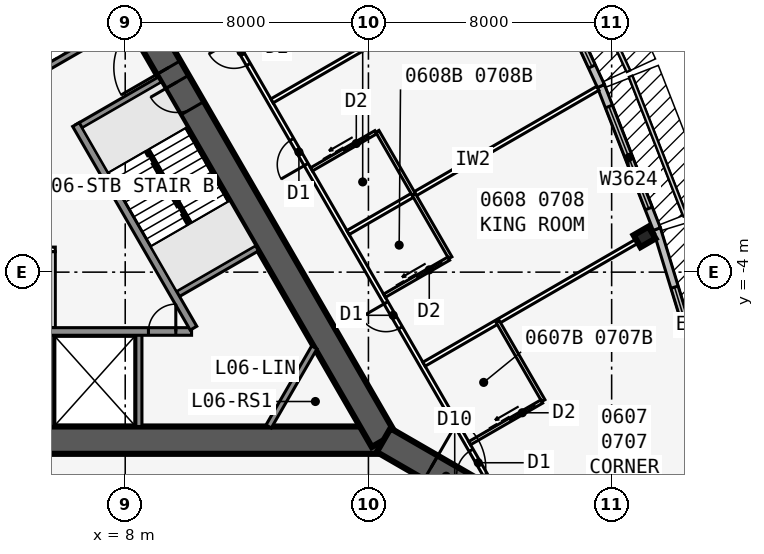
"""IFC4 building model, lengths in metres.
Left out: names, types, materials, properties, quantities, classifications, styles, units other than length and angle.
Written with IfcOpenShell. Run it as: python <this file> out.ifc"""

import sys

from ifc_helpers import new_model, si_unit, direction, frame, frame_2d, origin, origin_2d, place, context, subcontext, project, spatial, rectangle, i_section, extrude, element, fill, save


model = new_model("IFC4")
c1 = context("Model", 3, precision=1e-05, world=origin(), true_north=direction((0.0, 1.0)))
c2 = subcontext(c1, "Body", "Model", "MODEL_VIEW")
j1 = project(units=[si_unit("LENGTHUNIT", "METRE"), si_unit("PLANEANGLEUNIT", "RADIAN")], contexts=[c1])
p1 = place(None, origin())
s1 = spatial("IfcSite", under=j1, at=p1, CompositionType="ELEMENT")
p2 = place(p1, origin())
s2 = spatial("IfcBuilding", under=s1, at=p2, CompositionType="ELEMENT")
p3 = place(p2, frame((0.0, 0.0, 31.9)))
s3 = spatial("IfcBuildingStorey", under=s2, at=p3, CompositionType="ELEMENT", Elevation=31.9)
p4 = place(p3, frame((-16.5, -9.526, 0.0), z_axis=(0.0, 0.0, 1.0), x_axis=(1.0, 0.0, 0.0)))
e1 = element("IfcWall", 1, at=p4, inside=s3, PredefinedType="SHEAR", context=c2, shape_type="SweptSolid", body=[
    extrude(rectangle(XDim=33.0, YDim=0.9, at=frame_2d((16.5, 0.0))), origin(), (0.0, 0.0, 1.0), 3.4),
])
p5 = place(p4, frame((14.05, 0.0, 0.0)))
e2 = element("IfcOpeningElement", 2, at=p5, cuts=e1, PredefinedType="OPENING", context=c2, shape_type="SweptSolid", body=[
    extrude(rectangle(XDim=1.8, YDim=2.13, at=frame_2d((0.9, 1.065))), frame((0.0, 0.46, 0.0), z_axis=(0.0, -1.0, 0.0), x_axis=(1.0, 0.0, 0.0)), (0.0, 0.0, 1.0), 0.92),
])
p6 = place(p3, frame((-0.55, -5.951, 0.0), z_axis=(0.0, 0.0, 1.0), x_axis=(1.0, 0.0, 0.0)))
e3 = element("IfcWall", 3, at=p6, inside=s3, PredefinedType="SOLIDWALL", context=c2, shape_type="SweptSolid", body=[
    extrude(rectangle(XDim=10.733, YDim=0.25, at=frame_2d((5.366, 0.0))), origin(), (0.0, 0.0, 1.0), 3.235),
])
p7 = place(p6, frame((9.314, 0.0, 0.0)))
e4 = element("IfcOpeningElement", 4, at=p7, cuts=e3, PredefinedType="OPENING", context=c2, shape_type="SweptSolid", body=[
    extrude(rectangle(XDim=0.9, YDim=2.13, at=frame_2d((0.45, 1.065))), frame((0.0, 0.135, 0.0), z_axis=(0.0, -1.0, 0.0), x_axis=(1.0, 0.0, 0.0)), (0.0, 0.0, 1.0), 0.27),
])
p8 = place(p6, frame((1.05, 0.0, 0.0)))
e5 = element("IfcOpeningElement", 5, at=p8, cuts=e3, PredefinedType="OPENING", context=c2, shape_type="SweptSolid", body=[
    extrude(rectangle(XDim=1.1, YDim=2.13, at=frame_2d((0.55, 1.065))), frame((0.0, 0.135, 0.0), z_axis=(0.0, -1.0, 0.0), x_axis=(1.0, 0.0, 0.0)), (0.0, 0.0, 1.0), 0.27),
])
p9 = place(p6, frame((4.05, 0.0, 0.0)))
e6 = element("IfcOpeningElement", 6, at=p9, cuts=e3, PredefinedType="OPENING", context=c2, shape_type="SweptSolid", body=[
    extrude(rectangle(XDim=1.1, YDim=2.13, at=frame_2d((0.55, 1.065))), frame((0.0, 0.135, 0.0), z_axis=(0.0, -1.0, 0.0), x_axis=(1.0, 0.0, 0.0)), (0.0, 0.0, 1.0), 0.27),
])
for number, where, z_axis, x_axis in (
    (7, (5.55, -5.951, 0.0), (0.0, 0.0, 1.0), (0.0, -1.0, 0.0)),
    (8, (8.45, -5.951, 0.0), (0.0, 0.0, 1.0), (0.0, -1.0, 0.0)),
):
    element("IfcWall", number, at=place(p3, frame(where, z_axis=z_axis, x_axis=x_axis)), inside=s3, PredefinedType="SOLIDWALL", context=c2, shape_type="SweptSolid", body=[
        extrude(rectangle(XDim=3.125, YDim=0.2, at=frame_2d((1.562, 0.0))), origin(), (0.0, 0.0, 1.0), 3.235),
    ])
p10 = place(p3, frame((16.5, -9.526, 0.0), z_axis=(0.0, 0.0, 1.0), x_axis=(-0.499999749417, 0.866025548458, 0.0)))
e9 = element("IfcWall", 9, at=p10, inside=s3, PredefinedType="SHEAR", context=c2, shape_type="SweptSolid", body=[
    extrude(rectangle(XDim=33.0, YDim=0.9, at=frame_2d((16.5, 0.0))), origin(), (0.0, 0.0, 1.0), 3.4),
])
p11 = place(p10, frame((14.15, 0.0, 0.0)))
e10 = element("IfcOpeningElement", 10, at=p11, cuts=e9, PredefinedType="OPENING", context=c2, shape_type="SweptSolid", body=[
    extrude(rectangle(XDim=1.8, YDim=2.13, at=frame_2d((0.9, 1.065))), frame((0.0, 0.46, 0.0), z_axis=(0.0, -1.0, 0.0), x_axis=(1.0, 0.0, 0.0)), (0.0, 0.0, 1.0), 0.92),
])
p12 = place(p10, frame((12.6, 0.0, 0.0)))
e11 = element("IfcOpeningElement", 11, at=p12, cuts=e9, PredefinedType="OPENING", context=c2, shape_type="SweptSolid", body=[
    extrude(rectangle(XDim=1.0, YDim=2.13, at=frame_2d((0.5, 1.065))), frame((0.0, 0.46, 0.0), z_axis=(0.0, -1.0, 0.0), x_axis=(1.0, 0.0, 0.0)), (0.0, 0.0, 1.0), 0.92),
])
p13 = place(p3, frame((10.245, -5.843, 0.0), z_axis=(0.0, 0.0, 1.0), x_axis=(-0.499993009313, 0.866029439822, 0.0)))
e12 = element("IfcWall", 12, at=p13, inside=s3, PredefinedType="SOLIDWALL", context=c2, shape_type="SweptSolid", body=[
    extrude(rectangle(XDim=7.733, YDim=0.25, at=frame_2d((3.866, 0.0))), origin(), (0.0, 0.0, 1.0), 3.235),
])
for number, where, z_axis, x_axis in (
    (13, (9.629, -4.775, 0.0), (0.0, 0.0, 1.0), (0.866, 0.5, 0.0)),
    (14, (6.429, 0.767, 0.0), (0.0, 0.0, 1.0), (0.866, 0.5, 0.0)),
    (15, (5.329, 2.673, 0.0), (0.0, 0.0, 1.0), (0.866, 0.5, 0.0)),
):
    element("IfcWall", number, at=place(p3, frame(where, z_axis=z_axis, x_axis=x_axis)), inside=s3, PredefinedType="SOLIDWALL", context=c2, shape_type="SweptSolid", body=[
        extrude(rectangle(XDim=3.125, YDim=0.2, at=frame_2d((1.562, 0.0))), origin(), (0.0, 0.0, 1.0), 3.235),
    ])
p14 = place(p3, frame((16.5, -9.526, 0.0), z_axis=(0.0, 0.0, 1.0), x_axis=(0.866031398331, -0.499989616998, 0.0)))
e16 = element("IfcWall", 16, at=p14, inside=s3, PredefinedType="SHEAR", context=c2, shape_type="SweptSolid", body=[
    extrude(rectangle(XDim=4.746, YDim=0.9, at=frame_2d((2.373, 0.0))), origin(), (0.0, 0.0, 1.0), 3.4),
])
p15 = place(p14, frame((1.8, 0.0, 0.0)))
e17 = element("IfcOpeningElement", 17, at=p15, cuts=e16, PredefinedType="OPENING", context=c2, shape_type="SweptSolid", body=[
    extrude(rectangle(XDim=1.8, YDim=2.13, at=frame_2d((0.9, 1.065))), frame((0.0, 0.46, 0.0), z_axis=(0.0, -1.0, 0.0), x_axis=(1.0, 0.0, 0.0)), (0.0, 0.0, 1.0), 0.92),
])
p16 = place(p3, frame((25.083, -2.839, 0.0), z_axis=(0.0, 0.0, 1.0), x_axis=(-0.5, 0.866025403784, 0.0)))
e18 = element("IfcColumn", 18, at=p16, inside=s3, PredefinedType="COLUMN", context=c2, shape_type="SweptSolid", body=[
    extrude(i_section(OverallWidth=0.455, OverallDepth=0.569, WebThickness=0.078, FlangeThickness=0.125, at=origin_2d()), origin(), (0.0, 0.0, 1.0), 3.4),
])
p17 = place(p3, frame((27.88, -10.429, 0.0), z_axis=(0.0, 0.0, 1.0), x_axis=(-0.2919790669, 0.956424709265, 0.0)))
e19 = element("IfcWall", 19, at=p17, inside=s3, PredefinedType="STANDARD", context=c2, shape_type="SweptSolid", body=[
    extrude(rectangle(XDim=8.211, YDim=0.25, at=frame_2d((4.105, 0.0))), origin(), (0.0, 0.0, 1.0), 3.235),
])
p18 = place(p17, frame((2.006, 0.0, 0.45)))
e20 = element("IfcOpeningElement", 20, at=p18, cuts=e19, PredefinedType="OPENING", context=c2, shape_type="SweptSolid", body=[
    extrude(rectangle(XDim=4.2, YDim=2.4, at=frame_2d((2.1, 1.2))), frame((0.0, 0.135, 0.0), z_axis=(0.0, -1.0, 0.0), x_axis=(1.0, 0.0, 0.0)), (0.0, 0.0, 1.0), 0.27),
])
p19 = place(p3, frame((25.486, -2.584, 0.0), z_axis=(0.0, 0.0, 1.0), x_axis=(-0.364013463868, 0.931393685894, 0.0)))
e21 = element("IfcWall", 21, at=p19, inside=s3, PredefinedType="STANDARD", context=c2, shape_type="SweptSolid", body=[
    extrude(rectangle(XDim=5.058, YDim=0.25, at=frame_2d((2.529, 0.0))), origin(), (0.0, 0.0, 1.0), 3.235),
])
p20 = place(p19, frame((0.729, 0.0, 0.45)))
e22 = element("IfcOpeningElement", 22, at=p20, cuts=e21, PredefinedType="OPENING", context=c2, shape_type="SweptSolid", body=[
    extrude(rectangle(XDim=3.6, YDim=2.4, at=frame_2d((1.8, 1.2))), frame((0.0, 0.135, 0.0), z_axis=(0.0, -1.0, 0.0), x_axis=(1.0, 0.0, 0.0)), (0.0, 0.0, 1.0), 0.27),
])
p21 = place(p3, frame((23.648, 2.119, 0.0), z_axis=(0.0, 0.0, 1.0), x_axis=(-0.419203100754, 0.907892482796, 0.0)))
e23 = element("IfcWall", 23, at=p21, inside=s3, PredefinedType="STANDARD", context=c2, shape_type="SweptSolid", body=[
    extrude(rectangle(XDim=5.021, YDim=0.25, at=frame_2d((2.51, 0.0))), origin(), (0.0, 0.0, 1.0), 3.235),
])
p22 = place(p21, frame((0.71, 0.0, 0.45)))
e24 = element("IfcOpeningElement", 24, at=p22, cuts=e23, PredefinedType="OPENING", context=c2, shape_type="SweptSolid", body=[
    extrude(rectangle(XDim=3.6, YDim=2.4, at=frame_2d((1.8, 1.2))), frame((0.0, 0.135, 0.0), z_axis=(0.0, -1.0, 0.0), x_axis=(1.0, 0.0, 0.0)), (0.0, 0.0, 1.0), 0.27),
])
p23 = place(p3, frame((20.027, -10.985, 0.0), z_axis=(0.0, 0.0, 1.0), x_axis=(-0.500001677587, 0.866024435227, 0.0)))
e25 = element("IfcWall", 25, at=p23, inside=s3, PredefinedType="PARTITIONING", context=c2, shape_type="SweptSolid", body=[
    extrude(rectangle(XDim=39.054, YDim=0.15, at=frame_2d((19.527, 0.0))), origin(), (0.0, 0.0, 1.0), 3.235),
])
p24 = place(p23, frame((0.352, 0.0, 0.0)))
e26 = element("IfcOpeningElement", 26, at=p24, cuts=e25, PredefinedType="OPENING", context=c2, shape_type="SweptSolid", body=[
    extrude(rectangle(XDim=0.95, YDim=2.13, at=frame_2d((0.475, 1.065))), frame((0.0, 0.085, 0.0), z_axis=(0.0, -1.0, 0.0), x_axis=(1.0, 0.0, 0.0)), (0.0, 0.0, 1.0), 0.17),
])
p25 = place(p23, frame((5.952, 0.0, 0.0)))
e27 = element("IfcOpeningElement", 27, at=p25, cuts=e25, PredefinedType="OPENING", context=c2, shape_type="SweptSolid", body=[
    extrude(rectangle(XDim=0.95, YDim=2.13, at=frame_2d((0.475, 1.065))), frame((0.0, 0.085, 0.0), z_axis=(0.0, -1.0, 0.0), x_axis=(1.0, 0.0, 0.0)), (0.0, 0.0, 1.0), 0.17),
])
p26 = place(p23, frame((12.152, 0.0, 0.0)))
e28 = element("IfcOpeningElement", 28, at=p26, cuts=e25, PredefinedType="OPENING", context=c2, shape_type="SweptSolid", body=[
    extrude(rectangle(XDim=0.95, YDim=2.13, at=frame_2d((0.475, 1.065))), frame((0.0, 0.085, 0.0), z_axis=(0.0, -1.0, 0.0), x_axis=(1.0, 0.0, 0.0)), (0.0, 0.0, 1.0), 0.17),
])
p27 = place(p23, frame((15.952, 0.0, 0.0)))
e29 = element("IfcOpeningElement", 29, at=p27, cuts=e25, PredefinedType="OPENING", context=c2, shape_type="SweptSolid", body=[
    extrude(rectangle(XDim=0.95, YDim=2.13, at=frame_2d((0.475, 1.065))), frame((0.0, 0.085, 0.0), z_axis=(0.0, -1.0, 0.0), x_axis=(1.0, 0.0, 0.0)), (0.0, 0.0, 1.0), 0.17),
])
p28 = place(p23, frame((22.152, 0.0, 0.0)))
e30 = element("IfcOpeningElement", 30, at=p28, cuts=e25, PredefinedType="OPENING", context=c2, shape_type="SweptSolid", body=[
    extrude(rectangle(XDim=0.95, YDim=2.13, at=frame_2d((0.475, 1.065))), frame((0.0, 0.085, 0.0), z_axis=(0.0, -1.0, 0.0), x_axis=(1.0, 0.0, 0.0)), (0.0, 0.0, 1.0), 0.17),
])
p29 = place(p23, frame((25.952, 0.0, 0.0)))
e31 = element("IfcOpeningElement", 31, at=p29, cuts=e25, PredefinedType="OPENING", context=c2, shape_type="SweptSolid", body=[
    extrude(rectangle(XDim=0.95, YDim=2.13, at=frame_2d((0.475, 1.065))), frame((0.0, 0.085, 0.0), z_axis=(0.0, -1.0, 0.0), x_axis=(1.0, 0.0, 0.0)), (0.0, 0.0, 1.0), 0.17),
])
p30 = place(p23, frame((36.546, 0.0, 0.0)))
e32 = element("IfcOpeningElement", 32, at=p30, cuts=e25, PredefinedType="OPENING", context=c2, shape_type="SweptSolid", body=[
    extrude(rectangle(XDim=0.95, YDim=2.13, at=frame_2d((0.475, 1.065))), frame((0.0, 0.085, 0.0), z_axis=(0.0, -1.0, 0.0), x_axis=(1.0, 0.0, 0.0)), (0.0, 0.0, 1.0), 0.17),
])
p31 = place(p3, frame((17.829, -7.027, 0.0), z_axis=(0.0, 0.0, 1.0), x_axis=(0.866032659912, 0.499987431809, 0.0)))
e33 = element("IfcWall", 33, at=p31, inside=s3, PredefinedType="PARTITIONING", context=c2, shape_type="SweptSolid", body=[
    extrude(rectangle(XDim=8.72, YDim=0.15, at=frame_2d((4.36, 0.0))), origin(), (0.0, 0.0, 1.0), 2.389),
])
p32 = place(p3, frame((15.329, -2.697, 0.0), z_axis=(0.0, 0.0, 1.0), x_axis=(0.866018409083, 0.500012114982, 0.0)))
e34 = element("IfcWall", 34, at=p32, inside=s3, PredefinedType="PARTITIONING", context=c2, shape_type="SweptSolid", body=[
    extrude(rectangle(XDim=9.485, YDim=0.15, at=frame_2d((4.742, 0.0))), origin(), (0.0, 0.0, 1.0), 2.389),
])
p33 = place(p3, frame((12.829, 1.633, 0.0), z_axis=(0.0, 0.0, 1.0), x_axis=(0.866026934769, 0.499997348248, 0.0)))
e35 = element("IfcWall", 35, at=p33, inside=s3, PredefinedType="PARTITIONING", context=c2, shape_type="SweptSolid", body=[
    extrude(rectangle(XDim=9.943, YDim=0.15, at=frame_2d((4.971, 0.0))), origin(), (0.0, 0.0, 1.0), 2.389),
])
p34 = place(p3, frame((21.753, -8.225, 0.0), z_axis=(0.0, 0.0, 1.0), x_axis=(-0.499990139034, 0.866031096941, 0.0)))
e36 = element("IfcWall", 36, at=p34, inside=s3, PredefinedType="PLUMBINGWALL", context=c2, shape_type="SweptSolid", body=[
    extrude(rectangle(XDim=3.0, YDim=0.12, at=frame_2d((1.5, 0.0))), origin(), (0.0, 0.0, 1.0), 3.235),
])
p35 = place(p3, frame((19.329, -9.625, 0.0), z_axis=(0.0, 0.0, 1.0), x_axis=(0.866035715982, 0.499982138324, 0.0)))
e37 = element("IfcWall", 37, at=p35, inside=s3, PredefinedType="PLUMBINGWALL", context=c2, shape_type="SweptSolid", body=[
    extrude(rectangle(XDim=2.74, YDim=0.12, at=frame_2d((1.37, 0.0))), origin(), (0.0, 0.0, 1.0), 3.235),
])
p36 = place(p35, frame((1.55, 0.0, 0.0)))
e38 = element("IfcOpeningElement", 38, at=p36, cuts=e37, PredefinedType="OPENING", context=c2, shape_type="SweptSolid", body=[
    extrude(rectangle(XDim=0.9, YDim=2.13, at=frame_2d((0.45, 1.065))), frame((0.0, 0.07, 0.0), z_axis=(0.0, -1.0, 0.0), x_axis=(1.0, 0.0, 0.0)), (0.0, 0.0, 1.0), 0.14),
])
p37 = place(p3, frame((18.694, -3.526, 0.0), z_axis=(0.0, 0.0, 1.0), x_axis=(-0.500033551112, 0.866006032174, 0.0)))
e39 = element("IfcWall", 39, at=p37, inside=s3, PredefinedType="PLUMBINGWALL", context=c2, shape_type="SweptSolid", body=[
    extrude(rectangle(XDim=2.4, YDim=0.12, at=frame_2d((1.2, 0.0))), origin(), (0.0, 0.0, 1.0), 3.235),
])
p38 = place(p3, frame((16.529, -4.776, 0.0), z_axis=(0.0, 0.0, 1.0), x_axis=(0.866023955769, 0.500002508028, 0.0)))
e40 = element("IfcWall", 40, at=p38, inside=s3, PredefinedType="PLUMBINGWALL", context=c2, shape_type="SweptSolid", body=[
    extrude(rectangle(XDim=2.44, YDim=0.12, at=frame_2d((1.22, 0.0))), origin(), (0.0, 0.0, 1.0), 3.235),
])
p39 = place(p38, frame((1.25, 0.0, 0.0)))
e41 = element("IfcOpeningElement", 41, at=p39, cuts=e40, PredefinedType="OPENING", context=c2, shape_type="SweptSolid", body=[
    extrude(rectangle(XDim=0.9, YDim=2.13, at=frame_2d((0.45, 1.065))), frame((0.0, 0.07, 0.0), z_axis=(0.0, -1.0, 0.0), x_axis=(1.0, 0.0, 0.0)), (0.0, 0.0, 1.0), 0.14),
])
p40 = place(p3, frame((17.493, -1.447, 0.0), z_axis=(0.0, 0.0, 1.0), x_axis=(-0.500001309137, 0.866024647952, 0.0)))
e42 = element("IfcWall", 42, at=p40, inside=s3, PredefinedType="PLUMBINGWALL", context=c2, shape_type="SweptSolid", body=[
    extrude(rectangle(XDim=2.4, YDim=0.12, at=frame_2d((1.2, 0.0))), origin(), (0.0, 0.0, 1.0), 3.235),
])
p41 = place(p3, frame((14.128, -0.619, 0.0), z_axis=(0.0, 0.0, 1.0), x_axis=(0.866048967903, 0.499959183527, 0.0)))
e43 = element("IfcWall", 43, at=p41, inside=s3, PredefinedType="PLUMBINGWALL", context=c2, shape_type="SweptSolid", body=[
    extrude(rectangle(XDim=2.44, YDim=0.12, at=frame_2d((1.22, 0.0))), origin(), (0.0, 0.0, 1.0), 3.235),
])
p42 = place(p41, frame((1.25, 0.0, 0.0)))
e44 = element("IfcOpeningElement", 44, at=p42, cuts=e43, PredefinedType="OPENING", context=c2, shape_type="SweptSolid", body=[
    extrude(rectangle(XDim=0.9, YDim=2.13, at=frame_2d((0.45, 1.065))), frame((0.0, 0.07, 0.0), z_axis=(0.0, -1.0, 0.0), x_axis=(1.0, 0.0, 0.0)), (0.0, 0.0, 1.0), 0.14),
])
p43 = place(p3, frame((-2.65, -3.251, 0.0), z_axis=(0.0, 0.0, 1.0), x_axis=(1.0, 0.0, 0.0)))
e45 = element("IfcWall", 45, at=p43, inside=s3, PredefinedType="PARTITIONING", context=c2, shape_type="SweptSolid", body=[
    extrude(rectangle(XDim=8.35, YDim=0.15, at=frame_2d((4.175, 0.0))), origin(), (0.0, 0.0, 1.0), 3.235),
])
p44 = place(p3, frame((5.625, -5.826, 0.0), z_axis=(0.0, 0.0, 1.0), x_axis=(0.0, 1.0, 0.0)))
e46 = element("IfcWall", 46, at=p44, inside=s3, PredefinedType="PARTITIONING", context=c2, shape_type="SweptSolid", body=[
    extrude(rectangle(XDim=2.5, YDim=0.15, at=frame_2d((1.25, 0.0))), origin(), (0.0, 0.0, 1.0), 3.235),
])
p45 = place(p3, frame((14.219, -6.476, 0.0), z_axis=(0.0, 0.0, 1.0), x_axis=(-0.499952404951, -0.866052881055, 0.0)))
e47 = element("IfcWall", 47, at=p45, inside=s3, PredefinedType="SOLIDWALL", context=c2, shape_type="SweptSolid", body=[
    extrude(rectangle(XDim=3.002, YDim=0.2, at=frame_2d((1.501, 0.0))), origin(), (0.0, 0.0, 1.0), 3.235),
])
p46 = place(p3, frame((10.135, -2.401, 0.0), z_axis=(0.0, 0.0, 1.0), x_axis=(-0.499992232847, 0.866029888106, 0.0)))
e48 = element("IfcWall", 48, at=p46, inside=s3, PredefinedType="SOLIDWALL", context=c2, shape_type="SweptSolid", body=[
    extrude(rectangle(XDim=2.794, YDim=0.1, at=frame_2d((1.397, 0.0))), origin(), (0.0, 0.0, 1.0), 3.4),
])
p47 = place(p18, origin())
e49 = element("IfcWindow", 49, at=p47, inside=s3, PartitioningType="SINGLE_PANEL", PredefinedType="WINDOW", context=c2, shape_type="SweptSolid", body=[
    extrude(rectangle(XDim=4.2, YDim=2.4, at=frame_2d((2.1, 1.2))), frame((0.0, 0.03, 0.0), z_axis=(0.0, -1.0, 0.0), x_axis=(1.0, 0.0, 0.0)), (0.0, 0.0, 1.0), 0.06),
])
fill(e20, e49)
p48 = place(p20, origin())
e50 = element("IfcWindow", 50, at=p48, inside=s3, PartitioningType="SINGLE_PANEL", PredefinedType="WINDOW", context=c2, shape_type="SweptSolid", body=[
    extrude(rectangle(XDim=3.6, YDim=2.4, at=frame_2d((1.8, 1.2))), frame((0.0, 0.03, 0.0), z_axis=(0.0, -1.0, 0.0), x_axis=(1.0, 0.0, 0.0)), (0.0, 0.0, 1.0), 0.06),
])
fill(e22, e50)
p49 = place(p22, origin())
e51 = element("IfcWindow", 51, at=p49, inside=s3, PartitioningType="SINGLE_PANEL", PredefinedType="WINDOW", context=c2, shape_type="SweptSolid", body=[
    extrude(rectangle(XDim=3.6, YDim=2.4, at=frame_2d((1.8, 1.2))), frame((0.0, 0.03, 0.0), z_axis=(0.0, -1.0, 0.0), x_axis=(1.0, 0.0, 0.0)), (0.0, 0.0, 1.0), 0.06),
])
fill(e24, e51)
p50 = place(p36, origin())
e52 = element("IfcDoor", 52, at=p50, inside=s3, OperationType="SLIDING_TO_LEFT", PredefinedType="DOOR", context=c2, shape_type="SweptSolid", body=[
    extrude(rectangle(XDim=0.9, YDim=2.13, at=frame_2d((0.45, 1.065))), frame((0.0, 0.025, 0.0), z_axis=(0.0, -1.0, 0.0), x_axis=(1.0, 0.0, 0.0)), (0.0, 0.0, 1.0), 0.05),
])
fill(e38, e52)
p51 = place(p24, origin())
e53 = element("IfcDoor", 53, at=p51, inside=s3, OperationType="SINGLE_SWING_LEFT", PredefinedType="DOOR", context=c2, shape_type="SweptSolid", body=[
    extrude(rectangle(XDim=0.95, YDim=2.13, at=frame_2d((0.475, 1.065))), frame((0.0, 0.025, 0.0), z_axis=(0.0, -1.0, 0.0), x_axis=(1.0, 0.0, 0.0)), (0.0, 0.0, 1.0), 0.05),
])
fill(e26, e53)
p52 = place(p39, origin())
e54 = element("IfcDoor", 54, at=p52, inside=s3, OperationType="SLIDING_TO_LEFT", PredefinedType="DOOR", context=c2, shape_type="SweptSolid", body=[
    extrude(rectangle(XDim=0.9, YDim=2.13, at=frame_2d((0.45, 1.065))), frame((0.0, 0.025, 0.0), z_axis=(0.0, -1.0, 0.0), x_axis=(1.0, 0.0, 0.0)), (0.0, 0.0, 1.0), 0.05),
])
fill(e41, e54)
p53 = place(p25, origin())
e55 = element("IfcDoor", 55, at=p53, inside=s3, OperationType="SINGLE_SWING_RIGHT", PredefinedType="DOOR", context=c2, shape_type="SweptSolid", body=[
    extrude(rectangle(XDim=0.95, YDim=2.13, at=frame_2d((0.475, 1.065))), frame((0.0, 0.025, 0.0), z_axis=(0.0, -1.0, 0.0), x_axis=(1.0, 0.0, 0.0)), (0.0, 0.0, 1.0), 0.05),
])
fill(e27, e55)
p54 = place(p42, origin())
e56 = element("IfcDoor", 56, at=p54, inside=s3, OperationType="SLIDING_TO_LEFT", PredefinedType="DOOR", context=c2, shape_type="SweptSolid", body=[
    extrude(rectangle(XDim=0.9, YDim=2.13, at=frame_2d((0.45, 1.065))), frame((0.0, 0.025, 0.0), z_axis=(0.0, -1.0, 0.0), x_axis=(1.0, 0.0, 0.0)), (0.0, 0.0, 1.0), 0.05),
])
fill(e44, e56)
p55 = place(p26, origin())
e57 = element("IfcDoor", 57, at=p55, inside=s3, OperationType="SINGLE_SWING_LEFT", PredefinedType="DOOR", context=c2, shape_type="SweptSolid", body=[
    extrude(rectangle(XDim=0.95, YDim=2.13, at=frame_2d((0.475, 1.065))), frame((0.0, 0.025, 0.0), z_axis=(0.0, -1.0, 0.0), x_axis=(1.0, 0.0, 0.0)), (0.0, 0.0, 1.0), 0.05),
])
fill(e28, e57)
p56 = place(p27, origin())
e58 = element("IfcDoor", 58, at=p56, inside=s3, OperationType="SINGLE_SWING_RIGHT", PredefinedType="DOOR", context=c2, shape_type="SweptSolid", body=[
    extrude(rectangle(XDim=0.95, YDim=2.13, at=frame_2d((0.475, 1.065))), frame((0.0, 0.025, 0.0), z_axis=(0.0, -1.0, 0.0), x_axis=(1.0, 0.0, 0.0)), (0.0, 0.0, 1.0), 0.05),
])
fill(e29, e58)
p57 = place(p11, origin())
e59 = element("IfcDoor", 59, at=p57, inside=s3, OperationType="DOUBLE_DOOR_SINGLE_SWING", PredefinedType="DOOR", context=c2, shape_type="SweptSolid", body=[
    extrude(rectangle(XDim=1.8, YDim=2.13, at=frame_2d((0.9, 1.065))), frame((0.0, 0.025, 0.0), z_axis=(0.0, -1.0, 0.0), x_axis=(1.0, 0.0, 0.0)), (0.0, 0.0, 1.0), 0.05),
])
fill(e10, e59)
p58 = place(p12, origin())
e60 = element("IfcDoor", 60, at=p58, inside=s3, OperationType="SINGLE_SWING_RIGHT", PredefinedType="DOOR", context=c2, shape_type="SweptSolid", body=[
    extrude(rectangle(XDim=1.0, YDim=2.13, at=frame_2d((0.5, 1.065))), frame((0.0, 0.025, 0.0), z_axis=(0.0, -1.0, 0.0), x_axis=(1.0, 0.0, 0.0)), (0.0, 0.0, 1.0), 0.05),
])
fill(e11, e60)
p59 = place(p15, origin())
e61 = element("IfcDoor", 61, at=p59, inside=s3, OperationType="DOUBLE_DOOR_DOUBLE_SWING", PredefinedType="DOOR", context=c2, shape_type="SweptSolid", body=[
    extrude(rectangle(XDim=1.8, YDim=2.13, at=frame_2d((0.9, 1.065))), frame((0.0, 0.025, 0.0), z_axis=(0.0, -1.0, 0.0), x_axis=(1.0, 0.0, 0.0)), (0.0, 0.0, 1.0), 0.05),
])
fill(e17, e61)
p60 = place(p7, origin())
e62 = element("IfcDoor", 62, at=p60, inside=s3, OperationType="SINGLE_SWING_RIGHT", PredefinedType="DOOR", context=c2, shape_type="SweptSolid", body=[
    extrude(rectangle(XDim=0.9, YDim=2.13, at=frame_2d((0.45, 1.065))), frame((0.0, 0.025, 0.0), z_axis=(0.0, -1.0, 0.0), x_axis=(1.0, 0.0, 0.0)), (0.0, 0.0, 1.0), 0.05),
])
fill(e4, e62)
save(model, sys.argv[1])
